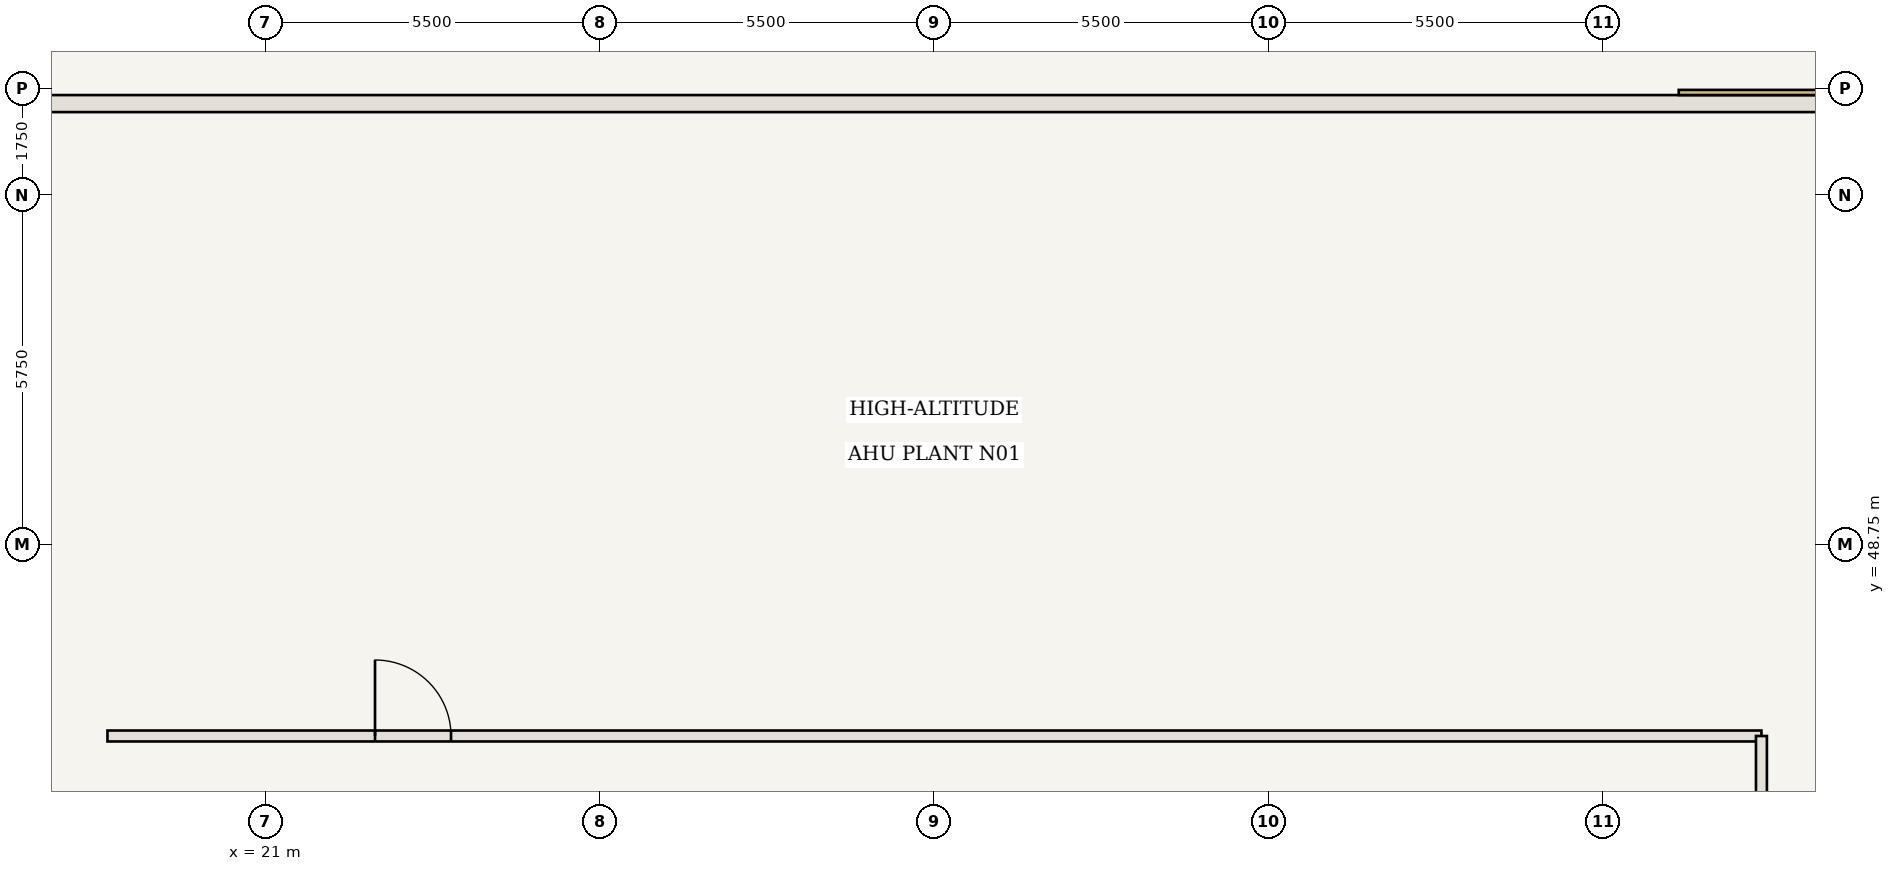
"""IFC4 building model, lengths in metres.
Left out: names, types, materials, properties, quantities, classifications, styles, units other than length and angle.
Written with IfcOpenShell. Run it as: python <this file> out.ifc"""

import sys

from ifc_helpers import new_model, si_unit, direction, frame, frame_2d, origin, place, context, subcontext, project, spatial, rectangle, extrude, element, fill, save


model = new_model("IFC4")
c1 = context("Model", 3, precision=1e-05, world=origin(), true_north=direction((0.0, 1.0)))
c2 = subcontext(c1, "Body", "Model", "MODEL_VIEW")
j1 = project(units=[si_unit("LENGTHUNIT", "METRE"), si_unit("PLANEANGLEUNIT", "RADIAN")], contexts=[c1])
p1 = place(None, origin())
s1 = spatial("IfcSite", under=j1, at=p1, CompositionType="ELEMENT")
p2 = place(p1, origin())
s2 = spatial("IfcBuilding", under=s1, at=p2, CompositionType="ELEMENT")
p3 = place(p2, frame((0.0, 0.0, 99.75)))
s3 = spatial("IfcBuildingStorey", under=s2, at=p3, CompositionType="ELEMENT", Elevation=99.75)
p4 = place(p3, frame((18.4, 45.6, 0.0), z_axis=(0.0, 0.0, 1.0), x_axis=(1.0, 0.0, 0.0)))
e1 = element("IfcWall", 1, at=p4, inside=s3, PredefinedType="STANDARD", context=c2, shape_type="SweptSolid", body=[
    extrude(rectangle(XDim=27.2, YDim=0.18, at=frame_2d((13.6, 0.0))), origin(), (0.0, 0.0, 1.0), 5.88),
])
p5 = place(p4, frame((4.4, 0.0, 0.0)))
e2 = element("IfcOpeningElement", 2, at=p5, cuts=e1, PredefinedType="OPENING", context=c2, shape_type="SweptSolid", body=[
    extrude(rectangle(XDim=1.25, YDim=2.2, at=frame_2d((0.625, 1.1))), frame((0.0, 0.1, 0.0), z_axis=(0.0, -1.0, 0.0), x_axis=(1.0, 0.0, 0.0)), (0.0, 0.0, 1.0), 0.2),
])
p6 = place(p3, frame((45.6, 18.4, 0.0), z_axis=(0.0, 0.0, 1.0), x_axis=(0.0, 1.0, 0.0)))
e3 = element("IfcWall", 3, at=p6, inside=s3, PredefinedType="STANDARD", context=c2, shape_type="SweptSolid", body=[
    extrude(rectangle(XDim=27.2, YDim=0.18, at=frame_2d((13.6, 0.0))), origin(), (0.0, 0.0, 1.0), 5.88),
])
p7 = place(p6, frame((14.55, 0.0, 0.0)))
e4 = element("IfcOpeningElement", 4, at=p7, cuts=e3, PredefinedType="OPENING", context=c2, shape_type="SweptSolid", body=[
    extrude(rectangle(XDim=1.25, YDim=2.2, at=frame_2d((0.625, 1.1))), frame((0.0, 0.1, 0.0), z_axis=(0.0, -1.0, 0.0), x_axis=(1.0, 0.0, 0.0)), (0.0, 0.0, 1.0), 0.2),
])
p8 = place(p3, frame((8.0, 56.0, 0.0), z_axis=(0.0, 0.0, 1.0), x_axis=(1.0, 0.0, 0.0)))
e5 = element("IfcWall", 5, at=p8, inside=s3, PredefinedType="USERDEFINED", context=c2, shape_type="SweptSolid", body=[
    extrude(rectangle(XDim=48.0, YDim=0.28, at=frame_2d((24.0, 0.0))), origin(), (0.0, 0.0, 1.0), 3.88),
])
p9 = place(p5, origin())
e6 = element("IfcDoor", 6, at=p9, inside=s3, OperationType="SINGLE_SWING_LEFT", PredefinedType="DOOR", context=c2, shape_type="SweptSolid", body=[
    extrude(rectangle(XDim=1.25, YDim=2.2, at=frame_2d((0.625, 1.1))), frame((0.0, 0.025, 0.0), z_axis=(0.0, -1.0, 0.0), x_axis=(1.0, 0.0, 0.0)), (0.0, 0.0, 1.0), 0.05),
])
fill(e2, e6)
save(model, sys.argv[1])
